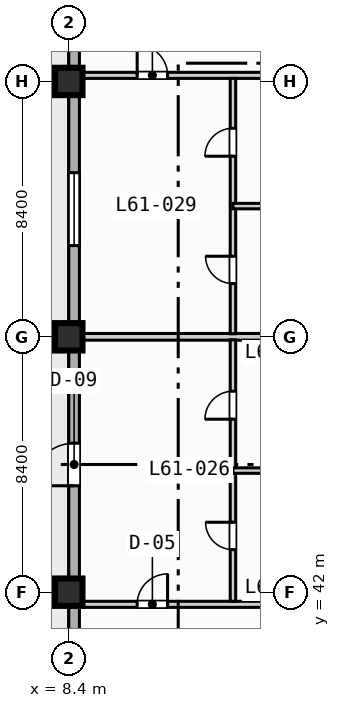
"""IFC4 building model, lengths in metres.
Left out: names, types, materials, properties, quantities, classifications, styles, units other than length and angle.
Written with IfcOpenShell. Run it as: python <this file> out.ifc"""

import sys

from ifc_helpers import new_model, si_unit, direction, frame, frame_2d, origin, origin_2d, place, context, subcontext, project, spatial, rectangle, extrude, element, fill, save


model = new_model("IFC4")
c1 = context("Model", 3, precision=1e-05, world=origin(), true_north=direction((0.0, 1.0)))
c2 = subcontext(c1, "Body", "Model", "MODEL_VIEW")
j1 = project(units=[si_unit("LENGTHUNIT", "METRE"), si_unit("PLANEANGLEUNIT", "RADIAN")], contexts=[c1])
p1 = place(None, origin())
s1 = spatial("IfcSite", under=j1, at=p1, CompositionType="ELEMENT")
p2 = place(p1, origin())
s2 = spatial("IfcBuilding", under=s1, at=p2, CompositionType="ELEMENT")
p3 = place(p2, frame((0.0, 0.0, 249.0)))
s3 = spatial("IfcBuildingStorey", under=s2, at=p3, CompositionType="ELEMENT", Elevation=249.0)
for number, where, z_axis, x_axis in (
    (1, (8.4, 42.0, 0.0), (0.0, 0.0, 1.0), (1.0, 0.0, 0.0)),
    (2, (8.4, 50.4, 0.0), (0.0, 0.0, 1.0), (1.0, 0.0, 0.0)),
    (3, (8.4, 58.8, 0.0), (0.0, 0.0, 1.0), (1.0, 0.0, 0.0)),
):
    element("IfcColumn", number, at=place(p3, frame(where, z_axis=z_axis, x_axis=x_axis)), inside=s3, PredefinedType="COLUMN", context=c2, shape_type="SweptSolid", body=[
        extrude(rectangle(XDim=0.9, YDim=0.9, at=origin_2d()), origin(), (0.0, 0.0, 1.0), 3.7),
    ])
p4 = place(p3, frame((8.575, 11.575, 0.0), z_axis=(0.0, 0.0, 1.0), x_axis=(0.0, 1.0, 0.0)))
e4 = element("IfcWall", 4, at=p4, inside=s3, PredefinedType="STANDARD", context=c2, shape_type="SweptSolid", body=[
    extrude(rectangle(XDim=60.85, YDim=0.35, at=frame_2d((30.425, 0.0))), origin(), (0.0, 0.0, 1.0), 3.47),
])
p5 = place(p4, frame((33.925, 0.0, 0.0)))
e5 = element("IfcOpeningElement", 5, at=p5, cuts=e4, PredefinedType="OPENING", context=c2, shape_type="SweptSolid", body=[
    extrude(rectangle(XDim=1.4, YDim=2.2, at=frame_2d((0.7, 1.1))), frame((0.0, 0.185, 0.0), z_axis=(0.0, -1.0, 0.0), x_axis=(1.0, 0.0, 0.0)), (0.0, 0.0, 1.0), 0.37),
])
p6 = place(p4, frame((25.025, 0.0, 0.85)))
e6 = element("IfcOpeningElement", 6, at=p6, cuts=e4, PredefinedType="OPENING", context=c2, shape_type="SweptSolid", body=[
    extrude(rectangle(XDim=2.4, YDim=1.95, at=frame_2d((1.2, 0.975))), frame((0.0, 0.185, 0.0), z_axis=(0.0, -1.0, 0.0), x_axis=(1.0, 0.0, 0.0)), (0.0, 0.0, 1.0), 0.37),
])
p7 = place(p4, frame((41.825, 0.0, 0.85)))
e7 = element("IfcOpeningElement", 7, at=p7, cuts=e4, PredefinedType="OPENING", context=c2, shape_type="SweptSolid", body=[
    extrude(rectangle(XDim=2.4, YDim=1.95, at=frame_2d((1.2, 0.975))), frame((0.0, 0.185, 0.0), z_axis=(0.0, -1.0, 0.0), x_axis=(1.0, 0.0, 0.0)), (0.0, 0.0, 1.0), 0.37),
])
p8 = place(p4, frame((19.25, 0.0, 0.85)))
e8 = element("IfcOpeningElement", 8, at=p8, cuts=e4, PredefinedType="OPENING", context=c2, shape_type="SweptSolid", body=[
    extrude(rectangle(XDim=1.8, YDim=1.8, at=frame_2d((0.9, 0.9))), frame((0.0, 0.185, 0.0), z_axis=(0.0, -1.0, 0.0), x_axis=(1.0, 0.0, 0.0)), (0.0, 0.0, 1.0), 0.37),
])
p9 = place(p3, frame((8.65, 41.6, 0.0), z_axis=(0.0, 0.0, 1.0), x_axis=(1.0, 0.0, 0.0)))
e9 = element("IfcWall", 9, at=p9, inside=s3, PredefinedType="PARTITIONING", context=c2, shape_type="SweptSolid", body=[
    extrude(rectangle(XDim=7.95, YDim=0.2, at=frame_2d((3.975, 0.0))), origin(), (0.0, 0.0, 1.0), 3.47),
])
p10 = place(p9, frame((2.0, 0.0, 0.0)))
e10 = element("IfcOpeningElement", 10, at=p10, cuts=e9, PredefinedType="OPENING", context=c2, shape_type="SweptSolid", body=[
    extrude(rectangle(XDim=1.0, YDim=2.15, at=frame_2d((0.5, 1.075))), frame((0.0, 0.11, 0.0), z_axis=(0.0, -1.0, 0.0), x_axis=(1.0, 0.0, 0.0)), (0.0, 0.0, 1.0), 0.22),
])
p11 = place(p3, frame((8.65, 59.0, 0.0), z_axis=(0.0, 0.0, 1.0), x_axis=(1.0, 0.0, 0.0)))
e11 = element("IfcWall", 11, at=p11, inside=s3, PredefinedType="PARTITIONING", context=c2, shape_type="SweptSolid", body=[
    extrude(rectangle(XDim=7.95, YDim=0.2, at=frame_2d((3.975, 0.0))), origin(), (0.0, 0.0, 1.0), 2.853),
])
p12 = place(p11, frame((2.0, 0.0, 0.0)))
e12 = element("IfcOpeningElement", 12, at=p12, cuts=e11, PredefinedType="OPENING", context=c2, shape_type="SweptSolid", body=[
    extrude(rectangle(XDim=1.0, YDim=2.15, at=frame_2d((0.5, 1.075))), frame((0.0, 0.11, 0.0), z_axis=(0.0, -1.0, 0.0), x_axis=(1.0, 0.0, 0.0)), (0.0, 0.0, 1.0), 0.22),
])
p13 = place(p3, frame((8.65, 50.4, 0.0), z_axis=(0.0, 0.0, 1.0), x_axis=(1.0, 0.0, 0.0)))
e13 = element("IfcWall", 13, at=p13, inside=s3, PredefinedType="PARTITIONING", context=c2, shape_type="SweptSolid", body=[
    extrude(rectangle(XDim=7.95, YDim=0.22, at=frame_2d((3.975, 0.0))), origin(), (0.0, 0.0, 1.0), 2.82),
])
p14 = place(p3, frame((13.8, 41.7, 0.0), z_axis=(0.0, 0.0, 1.0), x_axis=(0.0, 1.0, 0.0)))
e14 = element("IfcWall", 14, at=p14, inside=s3, PredefinedType="PLUMBINGWALL", context=c2, shape_type="SweptSolid", body=[
    extrude(rectangle(XDim=8.6, YDim=0.18, at=frame_2d((4.3, 0.0))), origin(), (0.0, 0.0, 1.0), 3.47),
])
p15 = place(p14, frame((1.7, 0.0, 0.0)))
e15 = element("IfcOpeningElement", 15, at=p15, cuts=e14, PredefinedType="OPENING", context=c2, shape_type="SweptSolid", body=[
    extrude(rectangle(XDim=0.9, YDim=2.1, at=frame_2d((0.45, 1.05))), frame((0.0, 0.1, 0.0), z_axis=(0.0, -1.0, 0.0), x_axis=(1.0, 0.0, 0.0)), (0.0, 0.0, 1.0), 0.2),
])
p16 = place(p14, frame((5.99, 0.0, 0.0)))
e16 = element("IfcOpeningElement", 16, at=p16, cuts=e14, PredefinedType="OPENING", context=c2, shape_type="SweptSolid", body=[
    extrude(rectangle(XDim=0.92, YDim=2.1, at=frame_2d((0.46, 1.05))), frame((0.0, 0.1, 0.0), z_axis=(0.0, -1.0, 0.0), x_axis=(1.0, 0.0, 0.0)), (0.0, 0.0, 1.0), 0.2),
])
p17 = place(p3, frame((13.8, 46.0, 0.0), z_axis=(0.0, 0.0, 1.0), x_axis=(1.0, 0.0, 0.0)))
e17 = element("IfcWall", 17, at=p17, inside=s3, PredefinedType="PLUMBINGWALL", context=c2, shape_type="SweptSolid", body=[
    extrude(rectangle(XDim=2.8, YDim=0.18, at=frame_2d((1.4, 0.0))), origin(), (0.0, 0.0, 1.0), 3.47),
])
p18 = place(p3, frame((13.8, 50.5, 0.0), z_axis=(0.0, 0.0, 1.0), x_axis=(0.0, 1.0, 0.0)))
e18 = element("IfcWall", 18, at=p18, inside=s3, PredefinedType="PLUMBINGWALL", context=c2, shape_type="SweptSolid", body=[
    extrude(rectangle(XDim=8.4, YDim=0.18, at=frame_2d((4.2, 0.0))), origin(), (0.0, 0.0, 1.0), 3.47),
])
p19 = place(p18, frame((1.65, 0.0, 0.0)))
e19 = element("IfcOpeningElement", 19, at=p19, cuts=e18, PredefinedType="OPENING", context=c2, shape_type="SweptSolid", body=[
    extrude(rectangle(XDim=0.9, YDim=2.1, at=frame_2d((0.45, 1.05))), frame((0.0, 0.1, 0.0), z_axis=(0.0, -1.0, 0.0), x_axis=(1.0, 0.0, 0.0)), (0.0, 0.0, 1.0), 0.2),
])
p20 = place(p18, frame((5.84, 0.0, 0.0)))
e20 = element("IfcOpeningElement", 20, at=p20, cuts=e18, PredefinedType="OPENING", context=c2, shape_type="SweptSolid", body=[
    extrude(rectangle(XDim=0.92, YDim=2.1, at=frame_2d((0.46, 1.05))), frame((0.0, 0.1, 0.0), z_axis=(0.0, -1.0, 0.0), x_axis=(1.0, 0.0, 0.0)), (0.0, 0.0, 1.0), 0.2),
])
p21 = place(p3, frame((13.8, 54.7, 0.0), z_axis=(0.0, 0.0, 1.0), x_axis=(1.0, 0.0, 0.0)))
e21 = element("IfcWall", 21, at=p21, inside=s3, PredefinedType="PLUMBINGWALL", context=c2, shape_type="SweptSolid", body=[
    extrude(rectangle(XDim=2.8, YDim=0.18, at=frame_2d((1.4, 0.0))), origin(), (0.0, 0.0, 1.0), 3.47),
])
p22 = place(p5, origin())
e22 = element("IfcDoor", 22, at=p22, inside=s3, OperationType="SINGLE_SWING_LEFT", PredefinedType="DOOR", context=c2, shape_type="SweptSolid", body=[
    extrude(rectangle(XDim=1.4, YDim=2.2, at=frame_2d((0.7, 1.1))), frame((0.0, 0.025, 0.0), z_axis=(0.0, -1.0, 0.0), x_axis=(1.0, 0.0, 0.0)), (0.0, 0.0, 1.0), 0.05),
])
fill(e5, e22)
p23 = place(p7, origin())
e23 = element("IfcWindow", 23, at=p23, inside=s3, PartitioningType="SINGLE_PANEL", PredefinedType="WINDOW", context=c2, shape_type="SweptSolid", body=[
    extrude(rectangle(XDim=2.4, YDim=1.95, at=frame_2d((1.2, 0.975))), frame((0.0, 0.03, 0.0), z_axis=(0.0, -1.0, 0.0), x_axis=(1.0, 0.0, 0.0)), (0.0, 0.0, 1.0), 0.06),
])
fill(e7, e23)
p24 = place(p10, origin())
e24 = element("IfcDoor", 24, at=p24, inside=s3, OperationType="SINGLE_SWING_RIGHT", PredefinedType="DOOR", context=c2, shape_type="SweptSolid", body=[
    extrude(rectangle(XDim=1.0, YDim=2.15, at=frame_2d((0.5, 1.075))), frame((0.0, 0.025, 0.0), z_axis=(0.0, -1.0, 0.0), x_axis=(1.0, 0.0, 0.0)), (0.0, 0.0, 1.0), 0.05),
])
fill(e10, e24)
p25 = place(p12, origin())
e25 = element("IfcDoor", 25, at=p25, inside=s3, OperationType="SINGLE_SWING_LEFT", PredefinedType="DOOR", context=c2, shape_type="SweptSolid", body=[
    extrude(rectangle(XDim=1.0, YDim=2.15, at=frame_2d((0.5, 1.075))), frame((0.0, 0.025, 0.0), z_axis=(0.0, -1.0, 0.0), x_axis=(1.0, 0.0, 0.0)), (0.0, 0.0, 1.0), 0.05),
])
fill(e12, e25)
p26 = place(p15, origin())
e26 = element("IfcDoor", 26, at=p26, inside=s3, OperationType="SINGLE_SWING_RIGHT", PredefinedType="DOOR", context=c2, shape_type="SweptSolid", body=[
    extrude(rectangle(XDim=0.9, YDim=2.1, at=frame_2d((0.45, 1.05))), frame((0.0, 0.025, 0.0), z_axis=(0.0, -1.0, 0.0), x_axis=(1.0, 0.0, 0.0)), (0.0, 0.0, 1.0), 0.05),
])
fill(e15, e26)
p27 = place(p16, origin())
e27 = element("IfcDoor", 27, at=p27, inside=s3, OperationType="SINGLE_SWING_LEFT", PredefinedType="DOOR", context=c2, shape_type="SweptSolid", body=[
    extrude(rectangle(XDim=0.92, YDim=2.1, at=frame_2d((0.46, 1.05))), frame((0.0, 0.025, 0.0), z_axis=(0.0, -1.0, 0.0), x_axis=(1.0, 0.0, 0.0)), (0.0, 0.0, 1.0), 0.05),
])
fill(e16, e27)
p28 = place(p19, origin())
e28 = element("IfcDoor", 28, at=p28, inside=s3, OperationType="SINGLE_SWING_RIGHT", PredefinedType="DOOR", context=c2, shape_type="SweptSolid", body=[
    extrude(rectangle(XDim=0.9, YDim=2.1, at=frame_2d((0.45, 1.05))), frame((0.0, 0.025, 0.0), z_axis=(0.0, -1.0, 0.0), x_axis=(1.0, 0.0, 0.0)), (0.0, 0.0, 1.0), 0.05),
])
fill(e19, e28)
p29 = place(p20, origin())
e29 = element("IfcDoor", 29, at=p29, inside=s3, OperationType="SINGLE_SWING_LEFT", PredefinedType="DOOR", context=c2, shape_type="SweptSolid", body=[
    extrude(rectangle(XDim=0.92, YDim=2.1, at=frame_2d((0.46, 1.05))), frame((0.0, 0.025, 0.0), z_axis=(0.0, -1.0, 0.0), x_axis=(1.0, 0.0, 0.0)), (0.0, 0.0, 1.0), 0.05),
])
fill(e20, e29)
save(model, sys.argv[1])
